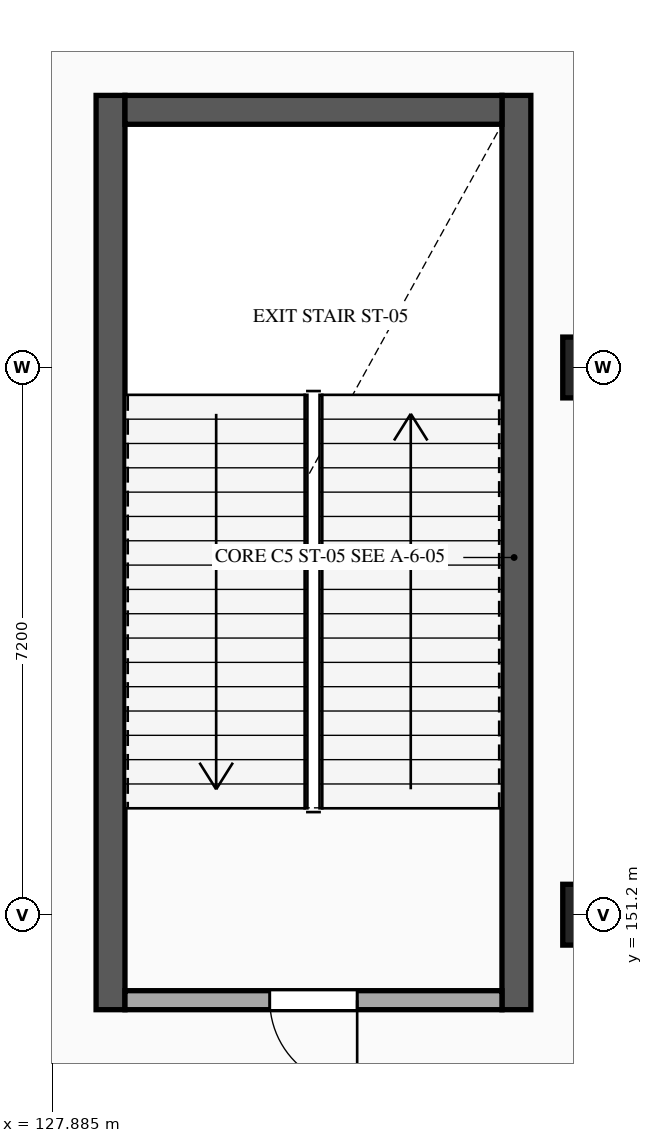
"""IFC4 building model, lengths in metres.
Left out: names, types, materials, properties, quantities, classifications, styles, units other than length and angle.
Written with IfcOpenShell. Run it as: python <this file> out.ifc"""

import sys

from ifc_helpers import new_model, si_unit, direction, frame, frame_2d, origin, origin_2d, place, context, subcontext, project, spatial, rectangle, extrude, element, fill, save


model = new_model("IFC4")
c1 = context("Model", 3, precision=1e-05, world=origin(), true_north=direction((0.0, 1.0)))
c2 = subcontext(c1, "Body", "Model", "MODEL_VIEW")
j1 = project(units=[si_unit("LENGTHUNIT", "METRE"), si_unit("PLANEANGLEUNIT", "RADIAN")], contexts=[c1])
p1 = place(None, origin())
s1 = spatial("IfcSite", under=j1, at=p1, CompositionType="ELEMENT")
p2 = place(p1, origin())
s2 = spatial("IfcBuilding", under=s1, at=p2, CompositionType="ELEMENT")
p3 = place(p2, origin())
s3 = spatial("IfcBuildingStorey", under=s2, at=p3, CompositionType="ELEMENT", Elevation=0.0)
for number, where, z_axis, x_axis in (
    (1, (135.0, 151.2, 0.0), (0.0, 0.0, 1.0), (1.0, 0.0, 0.0)),
    (2, (135.0, 158.4, 0.0), (0.0, 0.0, 1.0), (1.0, 0.0, 0.0)),
):
    element("IfcColumn", number, at=place(p3, frame(where, z_axis=z_axis, x_axis=x_axis)), inside=s3, PredefinedType="COLUMN", context=c2, shape_type="SweptSolid", body=[
        extrude(rectangle(XDim=0.8, YDim=0.8, at=origin_2d()), origin(), (0.0, 0.0, 1.0), 5.4),
    ])
for number, where, z_axis, x_axis in (
    (3, (128.65, 149.95, 0.0), (0.0, 0.0, 1.0), (0.0, 1.0, 0.0)),
    (4, (133.99, 161.98, 0.0), (0.0, 0.0, 1.0), (0.0, -1.0, 0.0)),
):
    element("IfcWall", number, at=place(p3, frame(where, z_axis=z_axis, x_axis=x_axis)), inside=s3, PredefinedType="SHEAR", context=c2, shape_type="SweptSolid", body=[
        extrude(rectangle(XDim=12.03, YDim=0.38, at=frame_2d((6.015, 0.0))), origin(), (0.0, 0.0, 1.0), 5.12),
    ])
p4 = place(p3, frame((128.84, 161.79, 0.0), z_axis=(0.0, 0.0, 1.0), x_axis=(1.0, 0.0, 0.0)))
e5 = element("IfcWall", 5, at=p4, inside=s3, PredefinedType="SHEAR", context=c2, shape_type="SweptSolid", body=[
    extrude(rectangle(XDim=4.96, YDim=0.38, at=frame_2d((2.48, 0.0))), origin(), (0.0, 0.0, 1.0), 5.12),
])
p5 = place(p3, frame((133.8, 150.075, 0.0), z_axis=(0.0, 0.0, 1.0), x_axis=(-1.0, 0.0, 0.0)))
e6 = element("IfcWall", 6, at=p5, inside=s3, PredefinedType="STANDARD", context=c2, shape_type="SweptSolid", body=[
    extrude(rectangle(XDim=4.96, YDim=0.25, at=frame_2d((2.48, 0.0))), origin(), (0.0, 0.0, 1.0), 5.08),
])
p6 = place(p5, frame((1.905, 0.0, 0.0)))
e7 = element("IfcOpeningElement", 7, at=p6, cuts=e6, PredefinedType="OPENING", context=c2, shape_type="SweptSolid", body=[
    extrude(rectangle(XDim=1.15, YDim=2.2, at=frame_2d((0.575, 1.1))), frame((0.0, 0.135, 0.0), z_axis=(0.0, -1.0, 0.0), x_axis=(1.0, 0.0, 0.0)), (0.0, 0.0, 1.0), 0.27),
])
p7 = place(p6, origin())
e8 = element("IfcDoor", 8, at=p7, inside=s3, OperationType="SINGLE_SWING_LEFT", PredefinedType="DOOR", context=c2, shape_type="SweptSolid", body=[
    extrude(rectangle(XDim=1.15, YDim=2.2, at=frame_2d((0.575, 1.1))), frame((0.0, 0.025, 0.0), z_axis=(0.0, -1.0, 0.0), x_axis=(1.0, 0.0, 0.0)), (0.0, 0.0, 1.0), 0.05),
])
fill(e7, e8)
save(model, sys.argv[1])
